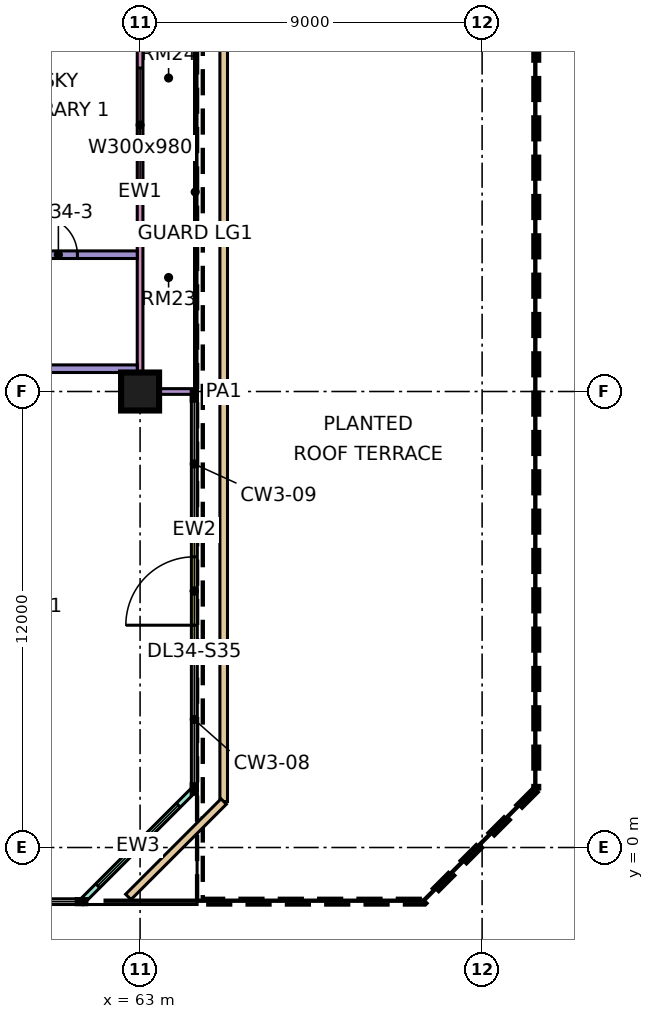
"""IFC4 building model, lengths in metres.
Left out: names, types, materials, properties, quantities, classifications, styles, units other than length and angle.
Written with IfcOpenShell. Run it as: python <this file> out.ifc"""

import sys

from ifc_helpers import new_model, si_unit, direction, frame, frame_2d, origin, origin_2d, place, context, subcontext, project, spatial, rectangle, extrude, element, fill, save


model = new_model("IFC4")
c1 = context("Model", 3, precision=1e-05, world=origin(), true_north=direction((0.0, 1.0)))
c2 = subcontext(c1, "Body", "Model", "MODEL_VIEW")
j1 = project(units=[si_unit("LENGTHUNIT", "METRE"), si_unit("PLANEANGLEUNIT", "RADIAN")], contexts=[c1])
p1 = place(None, origin())
s1 = spatial("IfcSite", under=j1, at=p1, CompositionType="ELEMENT")
p2 = place(p1, origin())
s2 = spatial("IfcBuilding", under=s1, at=p2, CompositionType="ELEMENT")
p3 = place(p2, frame((0.0, 0.0, 146.15)))
s3 = spatial("IfcBuildingStorey", under=s2, at=p3, CompositionType="ELEMENT", Elevation=146.15)
p4 = place(p3, frame((63.0, 12.0, 0.0), z_axis=(0.0, 0.0, 1.0), x_axis=(1.0, 0.0, 0.0)))
e1 = element("IfcColumn", 1, at=p4, inside=s3, PredefinedType="COLUMN", context=c2, shape_type="SweptSolid", body=[
    extrude(rectangle(XDim=1.0, YDim=1.0, at=origin_2d()), origin(), (0.0, 0.0, 1.0), 11.25),
])
p5 = place(p3, frame((61.447, -1.447, 0.0), z_axis=(0.0, 0.0, 1.0), x_axis=(0.707106781187, 0.707106781187, 0.0)))
e2 = element("IfcWall", 2, at=p5, inside=s3, PredefinedType="SOLIDWALL", context=c2, shape_type="SweptSolid", body=[
    extrude(rectangle(XDim=4.243, YDim=0.15, at=frame_2d((2.121, 0.0))), origin(), (0.0, 0.0, 1.0), 10.85),
])
p6 = place(p5, frame((0.621, 0.0, 0.45)))
e3 = element("IfcOpeningElement", 3, at=p6, cuts=e2, PredefinedType="OPENING", context=c2, shape_type="SweptSolid", body=[
    extrude(rectangle(XDim=3.0, YDim=9.8, at=frame_2d((1.5, 4.9))), frame((0.0, 0.085, 0.0), z_axis=(0.0, -1.0, 0.0), x_axis=(1.0, 0.0, 0.0)), (0.0, 0.0, 1.0), 0.17),
])
p7 = place(p3, frame((64.425, 5.25, 0.0), z_axis=(0.0, 0.0, 1.0), x_axis=(0.0, 1.0, 0.0)))
e4 = element("IfcWall", 4, at=p7, inside=s3, PredefinedType="SOLIDWALL", context=c2, shape_type="SweptSolid", body=[
    extrude(rectangle(XDim=3.0, YDim=0.15, at=frame_2d((1.5, 0.0))), origin(), (0.0, 0.0, 1.0), 10.85),
])
p8 = place(p7, frame((0.6, 0.0, 0.0)))
e5 = element("IfcOpeningElement", 5, at=p8, cuts=e4, PredefinedType="OPENING", context=c2, shape_type="SweptSolid", body=[
    extrude(rectangle(XDim=1.8, YDim=2.4, at=frame_2d((0.9, 1.2))), frame((0.0, 0.085, 0.0), z_axis=(0.0, -1.0, 0.0), x_axis=(1.0, 0.0, 0.0)), (0.0, 0.0, 1.0), 0.17),
])
p9 = place(p3, frame((63.0, 12.075, 0.0), z_axis=(0.0, 0.0, 1.0), x_axis=(0.0, 1.0, 0.0)))
e6 = element("IfcWall", 6, at=p9, inside=s3, PredefinedType="SOLIDWALL", context=c2, shape_type="SweptSolid", body=[
    extrude(rectangle(XDim=10.35, YDim=0.15, at=frame_2d((5.175, 0.0))), origin(), (0.0, 0.0, 1.0), 10.85),
])
p10 = place(p9, frame((5.438, 0.0, 0.45)))
e7 = element("IfcOpeningElement", 7, at=p10, cuts=e6, PredefinedType="OPENING", context=c2, shape_type="SweptSolid", body=[
    extrude(rectangle(XDim=3.0, YDim=9.8, at=frame_2d((1.5, 4.9))), frame((0.0, 0.085, 0.0), z_axis=(0.0, -1.0, 0.0), x_axis=(1.0, 0.0, 0.0)), (0.0, 0.0, 1.0), 0.17),
])
p11 = place(p3, frame((64.5, 12.0, 0.0), z_axis=(0.0, 0.0, 1.0), x_axis=(-1.0, 0.0, 0.0)))
e8 = element("IfcWall", 8, at=p11, inside=s3, PredefinedType="SOLIDWALL", context=c2, shape_type="SweptSolid", body=[
    extrude(rectangle(XDim=1.5, YDim=0.15, at=frame_2d((0.75, 0.0))), origin(), (0.0, 0.0, 1.0), 10.85),
])
p12 = place(p3, frame((65.2, 22.79, 0.0), z_axis=(0.0, 0.0, 1.0), x_axis=(0.0, -1.0, 0.0)))
e9 = element("IfcWall", 9, at=p12, inside=s3, PredefinedType="PARAPET", context=c2, shape_type="SweptSolid", body=[
    extrude(rectangle(XDim=21.58, YDim=0.2, at=frame_2d((10.79, 0.0))), origin(), (0.0, 0.0, 1.0), 0.5),
])
p13 = place(p3, frame((65.2, 1.21, 0.0), z_axis=(0.0, 0.0, 1.0), x_axis=(-0.707106781187, -0.707106781187, 0.0)))
e10 = element("IfcWall", 10, at=p13, inside=s3, PredefinedType="PARAPET", context=c2, shape_type="SweptSolid", body=[
    extrude(rectangle(XDim=3.55, YDim=0.2, at=frame_2d((1.775, 0.0))), origin(), (0.0, 0.0, 1.0), 0.5),
])
p14 = place(p3, frame((40.65, 12.6, 0.0), z_axis=(0.0, 0.0, 1.0), x_axis=(1.0, 0.0, 0.0)))
e11 = element("IfcWall", 11, at=p14, inside=s3, PredefinedType="PARTITIONING", context=c2, shape_type="SweptSolid", body=[
    extrude(rectangle(XDim=22.276, YDim=0.2, at=frame_2d((11.138, 0.0))), origin(), (0.0, 0.0, 1.0), 10.85),
])
p15 = place(p14, frame((8.25, 0.0, 0.0)))
e12 = element("IfcOpeningElement", 12, at=p15, cuts=e11, PredefinedType="OPENING", context=c2, shape_type="SweptSolid", body=[
    extrude(rectangle(XDim=1.0, YDim=2.1, at=frame_2d((0.5, 1.05))), frame((0.0, 0.11, 0.0), z_axis=(0.0, -1.0, 0.0), x_axis=(1.0, 0.0, 0.0)), (0.0, 0.0, 1.0), 0.22),
])
p16 = place(p14, frame((17.25, 0.0, 0.0)))
e13 = element("IfcOpeningElement", 13, at=p16, cuts=e11, PredefinedType="OPENING", context=c2, shape_type="SweptSolid", body=[
    extrude(rectangle(XDim=1.0, YDim=2.1, at=frame_2d((0.5, 1.05))), frame((0.0, 0.11, 0.0), z_axis=(0.0, -1.0, 0.0), x_axis=(1.0, 0.0, 0.0)), (0.0, 0.0, 1.0), 0.22),
])
p17 = place(p14, frame((14.0, 0.0, 0.0)))
e14 = element("IfcOpeningElement", 14, at=p17, cuts=e11, PredefinedType="OPENING", context=c2, shape_type="SweptSolid", body=[
    extrude(rectangle(XDim=1.0, YDim=2.1, at=frame_2d((0.5, 1.05))), frame((0.0, 0.11, 0.0), z_axis=(0.0, -1.0, 0.0), x_axis=(1.0, 0.0, 0.0)), (0.0, 0.0, 1.0), 0.22),
])
p18 = place(p3, frame((51.225, 15.6, 0.0), z_axis=(0.0, 0.0, 1.0), x_axis=(1.0, 0.0, 0.0)))
e15 = element("IfcWall", 15, at=p18, inside=s3, PredefinedType="PARTITIONING", context=c2, shape_type="SweptSolid", body=[
    extrude(rectangle(XDim=11.701, YDim=0.2, at=frame_2d((5.851, 0.0))), origin(), (0.0, 0.0, 1.0), 10.85),
])
p19 = place(p18, frame((3.175, 0.0, 0.0)))
e16 = element("IfcOpeningElement", 16, at=p19, cuts=e15, PredefinedType="OPENING", context=c2, shape_type="SweptSolid", body=[
    extrude(rectangle(XDim=1.0, YDim=2.1, at=frame_2d((0.5, 1.05))), frame((0.0, 0.11, 0.0), z_axis=(0.0, -1.0, 0.0), x_axis=(1.0, 0.0, 0.0)), (0.0, 0.0, 1.0), 0.22),
])
p20 = place(p18, frame((9.125, 0.0, 0.0)))
e17 = element("IfcOpeningElement", 17, at=p20, cuts=e15, PredefinedType="OPENING", context=c2, shape_type="SweptSolid", body=[
    extrude(rectangle(XDim=1.0, YDim=2.1, at=frame_2d((0.5, 1.05))), frame((0.0, 0.11, 0.0), z_axis=(0.0, -1.0, 0.0), x_axis=(1.0, 0.0, 0.0)), (0.0, 0.0, 1.0), 0.22),
])
p21 = place(p6, origin())
e18 = element("IfcWindow", 18, at=p21, inside=s3, PartitioningType="SINGLE_PANEL", PredefinedType="WINDOW", context=c2, shape_type="SweptSolid", body=[
    extrude(rectangle(XDim=3.0, YDim=9.8, at=frame_2d((1.5, 4.9))), frame((0.0, 0.03, 0.0), z_axis=(0.0, -1.0, 0.0), x_axis=(1.0, 0.0, 0.0)), (0.0, 0.0, 1.0), 0.06),
])
fill(e3, e18)
p22 = place(p8, origin())
e19 = element("IfcDoor", 19, at=p22, inside=s3, OperationType="DOUBLE_DOOR_SINGLE_SWING", PredefinedType="DOOR", context=c2, shape_type="SweptSolid", body=[
    extrude(rectangle(XDim=1.8, YDim=2.4, at=frame_2d((0.9, 1.2))), frame((0.0, 0.025, 0.0), z_axis=(0.0, -1.0, 0.0), x_axis=(1.0, 0.0, 0.0)), (0.0, 0.0, 1.0), 0.05),
])
fill(e5, e19)
p23 = place(p10, origin())
e20 = element("IfcWindow", 20, at=p23, inside=s3, PartitioningType="SINGLE_PANEL", PredefinedType="WINDOW", context=c2, shape_type="SweptSolid", body=[
    extrude(rectangle(XDim=3.0, YDim=9.8, at=frame_2d((1.5, 4.9))), frame((0.0, 0.03, 0.0), z_axis=(0.0, -1.0, 0.0), x_axis=(1.0, 0.0, 0.0)), (0.0, 0.0, 1.0), 0.06),
])
fill(e7, e20)
p24 = place(p20, origin())
e21 = element("IfcDoor", 21, at=p24, inside=s3, OperationType="SINGLE_SWING_LEFT", PredefinedType="DOOR", context=c2, shape_type="SweptSolid", body=[
    extrude(rectangle(XDim=1.0, YDim=2.1, at=frame_2d((0.5, 1.05))), frame((0.0, 0.025, 0.0), z_axis=(0.0, -1.0, 0.0), x_axis=(1.0, 0.0, 0.0)), (0.0, 0.0, 1.0), 0.05),
])
fill(e17, e21)
save(model, sys.argv[1])
